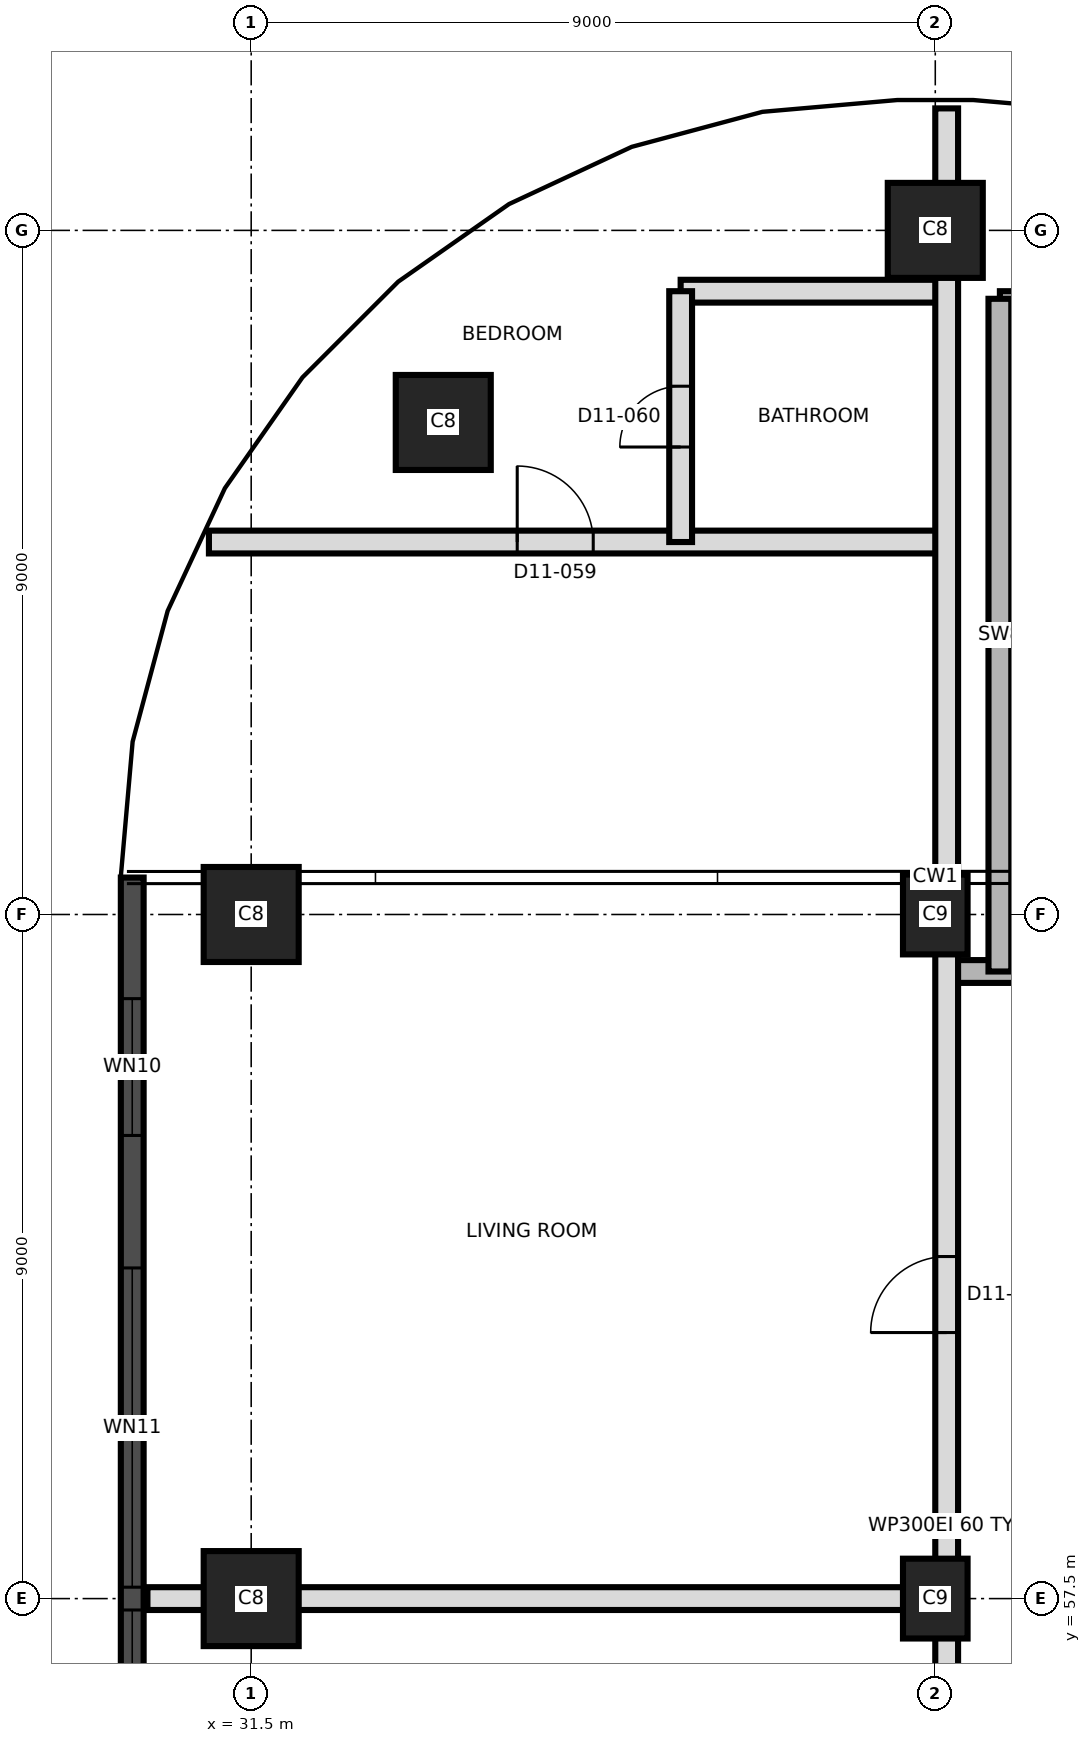
"""IFC4 building model, lengths in metres.
Left out: names, types, materials, properties, quantities, classifications, styles, units other than length and angle.
Written with IfcOpenShell. Run it as: python <this file> out.ifc"""

import sys

from ifc_helpers import new_model, si_unit, direction, frame, frame_2d, origin, origin_2d, place, context, subcontext, project, spatial, rectangle, extrude, element, fill, save


model = new_model("IFC4")
c1 = context("Model", 3, precision=1e-05, world=origin(), true_north=direction((0.0, 1.0)))
c2 = subcontext(c1, "Body", "Model", "MODEL_VIEW")
j1 = project(units=[si_unit("LENGTHUNIT", "METRE"), si_unit("PLANEANGLEUNIT", "RADIAN")], contexts=[c1])
p1 = place(None, origin())
s1 = spatial("IfcSite", under=j1, at=p1, CompositionType="ELEMENT")
p2 = place(p1, origin())
s2 = spatial("IfcBuilding", under=s1, at=p2, CompositionType="ELEMENT")
p3 = place(p2, frame((0.0, 0.0, 127.8)))
s3 = spatial("IfcBuildingStorey", under=s2, at=p3, CompositionType="ELEMENT", Elevation=127.8)
p4 = place(p3, frame((31.5, 57.5, 0.0), z_axis=(0.0, 0.0, 1.0), x_axis=(1.0, 0.0, 0.0)))
e1 = element("IfcColumn", 1, at=p4, inside=s3, PredefinedType="COLUMN", context=c2, shape_type="SweptSolid", body=[
    extrude(rectangle(XDim=1.25, YDim=1.25, at=origin_2d()), origin(), (0.0, 0.0, 1.0), 3.7),
])
p5 = place(p3, frame((40.5, 57.5, 0.0), z_axis=(0.0, 0.0, 1.0), x_axis=(0.0, 1.0, 0.0)))
e2 = element("IfcColumn", 2, at=p5, inside=s3, PredefinedType="COLUMN", context=c2, shape_type="SweptSolid", body=[
    extrude(rectangle(XDim=1.05, YDim=0.85, at=origin_2d()), origin(), (0.0, 0.0, 1.0), 3.7),
])
p6 = place(p3, frame((31.5, 66.5, 0.0), z_axis=(0.0, 0.0, 1.0), x_axis=(1.0, 0.0, 0.0)))
e3 = element("IfcColumn", 3, at=p6, inside=s3, PredefinedType="COLUMN", context=c2, shape_type="SweptSolid", body=[
    extrude(rectangle(XDim=1.25, YDim=1.25, at=origin_2d()), origin(), (0.0, 0.0, 1.0), 3.7),
])
p7 = place(p3, frame((40.5, 66.5, 0.0), z_axis=(0.0, 0.0, 1.0), x_axis=(0.0, 1.0, 0.0)))
e4 = element("IfcColumn", 4, at=p7, inside=s3, PredefinedType="COLUMN", context=c2, shape_type="SweptSolid", body=[
    extrude(rectangle(XDim=1.05, YDim=0.85, at=origin_2d()), origin(), (0.0, 0.0, 1.0), 3.7),
])
for number, where, z_axis, x_axis in (
    (5, (34.027, 72.973, 0.0), (0.0, 0.0, 1.0), (1.0, 0.0, 0.0)),
    (6, (40.5, 75.5, 0.0), (0.0, 0.0, 1.0), (1.0, 0.0, 0.0)),
):
    element("IfcColumn", number, at=place(p3, frame(where, z_axis=z_axis, x_axis=x_axis)), inside=s3, PredefinedType="COLUMN", context=c2, shape_type="SweptSolid", body=[
        extrude(rectangle(XDim=1.25, YDim=1.25, at=origin_2d()), origin(), (0.0, 0.0, 1.0), 3.7),
    ])
p8 = place(p3, frame((29.935, 66.986, 0.0), z_axis=(0.0, 0.0, 1.0), x_axis=(0.0, -1.0, 0.0)))
e7 = element("IfcWall", 7, at=p8, inside=s3, PredefinedType="SOLIDWALL", context=c2, shape_type="SweptSolid", body=[
    extrude(rectangle(XDim=32.976, YDim=0.3, at=frame_2d((16.488, 0.0))), origin(), (0.0, 0.0, 1.0), 3.4),
])
p9 = place(p8, frame((1.593, 0.0, 0.3)))
e8 = element("IfcOpeningElement", 8, at=p9, cuts=e7, PredefinedType="OPENING", context=c2, shape_type="SweptSolid", body=[
    extrude(rectangle(XDim=1.8, YDim=2.4, at=frame_2d((0.9, 1.2))), frame((0.0, 0.16, 0.0), z_axis=(0.0, -1.0, 0.0), x_axis=(1.0, 0.0, 0.0)), (0.0, 0.0, 1.0), 0.32),
])
p10 = place(p8, frame((5.136, 0.0, 0.9)))
e9 = element("IfcOpeningElement", 9, at=p10, cuts=e7, PredefinedType="OPENING", context=c2, shape_type="SweptSolid", body=[
    extrude(rectangle(XDim=4.2, YDim=1.5, at=frame_2d((2.1, 0.75))), frame((0.0, 0.16, 0.0), z_axis=(0.0, -1.0, 0.0), x_axis=(1.0, 0.0, 0.0)), (0.0, 0.0, 1.0), 0.32),
])
p11 = place(p8, frame((9.636, 0.0, 0.9)))
e10 = element("IfcOpeningElement", 10, at=p11, cuts=e7, PredefinedType="OPENING", context=c2, shape_type="SweptSolid", body=[
    extrude(rectangle(XDim=4.2, YDim=1.5, at=frame_2d((2.1, 0.75))), frame((0.0, 0.16, 0.0), z_axis=(0.0, -1.0, 0.0), x_axis=(1.0, 0.0, 0.0)), (0.0, 0.0, 1.0), 0.32),
])
p12 = place(p8, frame((14.136, 0.0, 0.9)))
e11 = element("IfcOpeningElement", 11, at=p12, cuts=e7, PredefinedType="OPENING", context=c2, shape_type="SweptSolid", body=[
    extrude(rectangle(XDim=4.2, YDim=1.5, at=frame_2d((2.1, 0.75))), frame((0.0, 0.16, 0.0), z_axis=(0.0, -1.0, 0.0), x_axis=(1.0, 0.0, 0.0)), (0.0, 0.0, 1.0), 0.32),
])
p13 = place(p8, frame((18.636, 0.0, 0.9)))
e12 = element("IfcOpeningElement", 12, at=p13, cuts=e7, PredefinedType="OPENING", context=c2, shape_type="SweptSolid", body=[
    extrude(rectangle(XDim=4.2, YDim=1.5, at=frame_2d((2.1, 0.75))), frame((0.0, 0.16, 0.0), z_axis=(0.0, -1.0, 0.0), x_axis=(1.0, 0.0, 0.0)), (0.0, 0.0, 1.0), 0.32),
])
p14 = place(p8, frame((23.136, 0.0, 0.9)))
e13 = element("IfcOpeningElement", 13, at=p14, cuts=e7, PredefinedType="OPENING", context=c2, shape_type="SweptSolid", body=[
    extrude(rectangle(XDim=4.2, YDim=1.5, at=frame_2d((2.1, 0.75))), frame((0.0, 0.16, 0.0), z_axis=(0.0, -1.0, 0.0), x_axis=(1.0, 0.0, 0.0)), (0.0, 0.0, 1.0), 0.32),
])
p15 = place(p8, frame((29.331, 0.0, 0.3)))
e14 = element("IfcOpeningElement", 14, at=p15, cuts=e7, PredefinedType="OPENING", context=c2, shape_type="SweptSolid", body=[
    extrude(rectangle(XDim=1.8, YDim=2.4, at=frame_2d((0.9, 1.2))), frame((0.0, 0.16, 0.0), z_axis=(0.0, -1.0, 0.0), x_axis=(1.0, 0.0, 0.0)), (0.0, 0.0, 1.0), 0.32),
])
p16 = place(p3, frame((30.135, 57.5, 0.0), z_axis=(0.0, 0.0, 1.0), x_axis=(1.0, 0.0, 0.0)))
e15 = element("IfcWall", 15, at=p16, inside=s3, PredefinedType="PARTITIONING", context=c2, shape_type="SweptSolid", body=[
    extrude(rectangle(XDim=10.515, YDim=0.3, at=frame_2d((5.257, 0.0))), origin(), (0.0, 0.0, 1.0), 3.4),
])
p17 = place(p3, frame((40.65, 65.75, 0.0), z_axis=(0.0, 0.0, 1.0), x_axis=(1.0, 0.0, 0.0)))
e16 = element("IfcWall", 16, at=p17, inside=s3, PredefinedType="SHEAR", context=c2, shape_type="SweptSolid", body=[
    extrude(rectangle(XDim=3.7, YDim=0.3, at=frame_2d((1.85, 0.0))), origin(), (0.0, 0.0, 1.0), 3.4),
])
p18 = place(p17, frame((1.1, 0.0, 0.0)))
e17 = element("IfcOpeningElement", 17, at=p18, cuts=e16, PredefinedType="OPENING", context=c2, shape_type="SweptSolid", body=[
    extrude(rectangle(XDim=1.2, YDim=2.1, at=frame_2d((0.6, 1.05))), frame((0.0, 0.16, 0.0), z_axis=(0.0, -1.0, 0.0), x_axis=(1.0, 0.0, 0.0)), (0.0, 0.0, 1.0), 0.32),
])
p19 = place(p3, frame((30.944, 71.4, 0.0), z_axis=(0.0, 0.0, 1.0), x_axis=(1.0, 0.0, 0.0)))
e18 = element("IfcWall", 18, at=p19, inside=s3, PredefinedType="PARTITIONING", context=c2, shape_type="SweptSolid", body=[
    extrude(rectangle(XDim=9.706, YDim=0.3, at=frame_2d((4.853, 0.0))), origin(), (0.0, 0.0, 1.0), 3.4),
])
p20 = place(p19, frame((4.056, 0.0, 0.0)))
e19 = element("IfcOpeningElement", 19, at=p20, cuts=e18, PredefinedType="OPENING", context=c2, shape_type="SweptSolid", body=[
    extrude(rectangle(XDim=1.0, YDim=2.1, at=frame_2d((0.5, 1.05))), frame((0.0, 0.16, 0.0), z_axis=(0.0, -1.0, 0.0), x_axis=(1.0, 0.0, 0.0)), (0.0, 0.0, 1.0), 0.32),
])
p21 = place(p3, frame((41.35, 74.55, 0.0), z_axis=(0.0, 0.0, 1.0), x_axis=(1.0, 0.0, 0.0)))
e20 = element("IfcWall", 20, at=p21, inside=s3, PredefinedType="SHEAR", context=c2, shape_type="SweptSolid", body=[
    extrude(rectangle(XDim=3.0, YDim=0.3, at=frame_2d((1.5, 0.0))), origin(), (0.0, 0.0, 1.0), 3.4),
])
p22 = place(p3, frame((37.15, 74.7, 0.0), z_axis=(0.0, 0.0, 1.0), x_axis=(1.0, 0.0, 0.0)))
e21 = element("IfcWall", 21, at=p22, inside=s3, PredefinedType="PARTITIONING", context=c2, shape_type="SweptSolid", body=[
    extrude(rectangle(XDim=3.5, YDim=0.3, at=frame_2d((1.75, 0.0))), origin(), (0.0, 0.0, 1.0), 3.4),
])
p23 = place(p3, frame((37.15, 71.4, 0.0), z_axis=(0.0, 0.0, 1.0), x_axis=(0.0, 1.0, 0.0)))
e22 = element("IfcWall", 22, at=p23, inside=s3, PredefinedType="PARTITIONING", context=c2, shape_type="SweptSolid", body=[
    extrude(rectangle(XDim=3.3, YDim=0.3, at=frame_2d((1.65, 0.0))), origin(), (0.0, 0.0, 1.0), 3.4),
])
p24 = place(p23, frame((1.25, 0.0, 0.0)))
e23 = element("IfcOpeningElement", 23, at=p24, cuts=e22, PredefinedType="OPENING", context=c2, shape_type="SweptSolid", body=[
    extrude(rectangle(XDim=0.8, YDim=2.1, at=frame_2d((0.4, 1.05))), frame((0.0, 0.16, 0.0), z_axis=(0.0, -1.0, 0.0), x_axis=(1.0, 0.0, 0.0)), (0.0, 0.0, 1.0), 0.32),
])
p25 = place(p3, frame((40.65, 39.8, 0.0), z_axis=(0.0, 0.0, 1.0), x_axis=(0.0, 1.0, 0.0)))
e24 = element("IfcWall", 24, at=p25, inside=s3, PredefinedType="PARTITIONING", context=c2, shape_type="SweptSolid", body=[
    extrude(rectangle(XDim=37.305, YDim=0.3, at=frame_2d((18.652, 0.0))), origin(), (0.0, 0.0, 1.0), 3.4),
])
p26 = place(p25, frame((0.85, 0.0, 0.0)))
e25 = element("IfcOpeningElement", 25, at=p26, cuts=e24, PredefinedType="OPENING", context=c2, shape_type="SweptSolid", body=[
    extrude(rectangle(XDim=1.0, YDim=2.1, at=frame_2d((0.5, 1.05))), frame((0.0, 0.16, 0.0), z_axis=(0.0, -1.0, 0.0), x_axis=(1.0, 0.0, 0.0)), (0.0, 0.0, 1.0), 0.32),
])
p27 = place(p25, frame((6.7, 0.0, 0.0)))
e26 = element("IfcOpeningElement", 26, at=p27, cuts=e24, PredefinedType="OPENING", context=c2, shape_type="SweptSolid", body=[
    extrude(rectangle(XDim=1.0, YDim=2.1, at=frame_2d((0.5, 1.05))), frame((0.0, 0.16, 0.0), z_axis=(0.0, -1.0, 0.0), x_axis=(1.0, 0.0, 0.0)), (0.0, 0.0, 1.0), 0.32),
])
p28 = place(p25, frame((14.35, 0.0, 0.0)))
e27 = element("IfcOpeningElement", 27, at=p28, cuts=e24, PredefinedType="OPENING", context=c2, shape_type="SweptSolid", body=[
    extrude(rectangle(XDim=1.0, YDim=2.4, at=frame_2d((0.5, 1.2))), frame((0.0, 0.16, 0.0), z_axis=(0.0, -1.0, 0.0), x_axis=(1.0, 0.0, 0.0)), (0.0, 0.0, 1.0), 0.32),
])
p29 = place(p25, frame((21.2, 0.0, 0.0)))
e28 = element("IfcOpeningElement", 28, at=p29, cuts=e24, PredefinedType="OPENING", context=c2, shape_type="SweptSolid", body=[
    extrude(rectangle(XDim=1.0, YDim=2.4, at=frame_2d((0.5, 1.2))), frame((0.0, 0.16, 0.0), z_axis=(0.0, -1.0, 0.0), x_axis=(1.0, 0.0, 0.0)), (0.0, 0.0, 1.0), 0.32),
])
p30 = place(p3, frame((41.35, 65.75, 0.0), z_axis=(0.0, 0.0, 1.0), x_axis=(0.0, 1.0, 0.0)))
e29 = element("IfcWall", 29, at=p30, inside=s3, PredefinedType="SHEAR", context=c2, shape_type="SweptSolid", body=[
    extrude(rectangle(XDim=8.85, YDim=0.3, at=frame_2d((4.425, 0.0))), origin(), (0.0, 0.0, 1.0), 3.4),
])
p31 = place(p9, origin())
e30 = element("IfcWindow", 30, at=p31, inside=s3, PartitioningType="SINGLE_PANEL", PredefinedType="WINDOW", context=c2, shape_type="SweptSolid", body=[
    extrude(rectangle(XDim=1.8, YDim=2.4, at=frame_2d((0.9, 1.2))), frame((0.0, 0.03, 0.0), z_axis=(0.0, -1.0, 0.0), x_axis=(1.0, 0.0, 0.0)), (0.0, 0.0, 1.0), 0.06),
])
fill(e8, e30)
p32 = place(p10, origin())
e31 = element("IfcWindow", 31, at=p32, inside=s3, PartitioningType="SINGLE_PANEL", PredefinedType="WINDOW", context=c2, shape_type="SweptSolid", body=[
    extrude(rectangle(XDim=4.2, YDim=1.5, at=frame_2d((2.1, 0.75))), frame((0.0, 0.03, 0.0), z_axis=(0.0, -1.0, 0.0), x_axis=(1.0, 0.0, 0.0)), (0.0, 0.0, 1.0), 0.06),
])
fill(e9, e31)
p33 = place(p11, origin())
e32 = element("IfcWindow", 32, at=p33, inside=s3, PartitioningType="SINGLE_PANEL", PredefinedType="WINDOW", context=c2, shape_type="SweptSolid", body=[
    extrude(rectangle(XDim=4.2, YDim=1.5, at=frame_2d((2.1, 0.75))), frame((0.0, 0.03, 0.0), z_axis=(0.0, -1.0, 0.0), x_axis=(1.0, 0.0, 0.0)), (0.0, 0.0, 1.0), 0.06),
])
fill(e10, e32)
p34 = place(p29, origin())
e33 = element("IfcDoor", 33, at=p34, inside=s3, OperationType="SINGLE_SWING_LEFT", PredefinedType="DOOR", context=c2, shape_type="SweptSolid", body=[
    extrude(rectangle(XDim=1.0, YDim=2.4, at=frame_2d((0.5, 1.2))), frame((0.0, 0.025, 0.0), z_axis=(0.0, -1.0, 0.0), x_axis=(1.0, 0.0, 0.0)), (0.0, 0.0, 1.0), 0.05),
])
fill(e28, e33)
p35 = place(p20, origin())
e34 = element("IfcDoor", 34, at=p35, inside=s3, OperationType="SINGLE_SWING_RIGHT", PredefinedType="DOOR", context=c2, shape_type="SweptSolid", body=[
    extrude(rectangle(XDim=1.0, YDim=2.1, at=frame_2d((0.5, 1.05))), frame((0.0, 0.025, 0.0), z_axis=(0.0, -1.0, 0.0), x_axis=(1.0, 0.0, 0.0)), (0.0, 0.0, 1.0), 0.05),
])
fill(e19, e34)
p36 = place(p24, origin())
e35 = element("IfcDoor", 35, at=p36, inside=s3, OperationType="SINGLE_SWING_LEFT", PredefinedType="DOOR", context=c2, shape_type="SweptSolid", body=[
    extrude(rectangle(XDim=0.8, YDim=2.1, at=frame_2d((0.4, 1.05))), frame((0.0, 0.025, 0.0), z_axis=(0.0, -1.0, 0.0), x_axis=(1.0, 0.0, 0.0)), (0.0, 0.0, 1.0), 0.05),
])
fill(e23, e35)
save(model, sys.argv[1])
